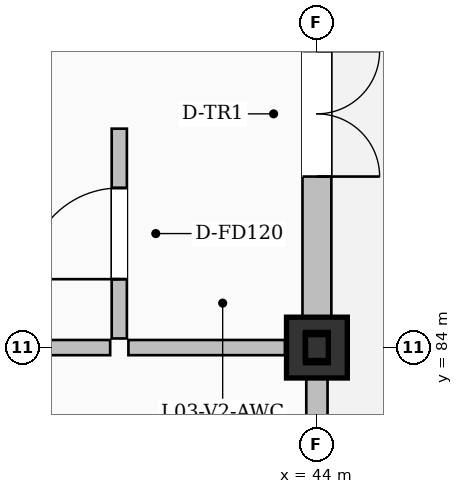
"""IFC4 building model, lengths in metres.
Left out: names, types, materials, properties, quantities, classifications, styles, units other than length and angle.
Written with IfcOpenShell. Run it as: python <this file> out.ifc"""

import sys

from ifc_helpers import new_model, si_unit, direction, frame, frame_2d, origin, origin_2d, place, context, subcontext, project, spatial, rectangle, i_section, extrude, element, fill, save


model = new_model("IFC4")
c1 = context("Model", 3, precision=1e-05, world=origin(), true_north=direction((0.0, 1.0)))
c2 = subcontext(c1, "Body", "Model", "MODEL_VIEW")
j1 = project(units=[si_unit("LENGTHUNIT", "METRE"), si_unit("PLANEANGLEUNIT", "RADIAN")], contexts=[c1])
p1 = place(None, origin())
s1 = spatial("IfcSite", under=j1, at=p1, CompositionType="ELEMENT")
p2 = place(p1, origin())
s2 = spatial("IfcBuilding", under=s1, at=p2, CompositionType="ELEMENT")
p3 = place(p2, frame((0.0, 0.0, 13.8)))
s3 = spatial("IfcBuildingStorey", under=s2, at=p3, CompositionType="ELEMENT", Elevation=13.8)
p4 = place(p3, frame((44.0, 84.0, 0.0), z_axis=(0.0, 0.0, 1.0), x_axis=(1.0, 0.0, 0.0)))
e1 = element("IfcColumn", 1, at=p4, inside=s3, PredefinedType="COLUMN", context=c2, shape_type="SweptSolid", body=[
    extrude(rectangle(XDim=0.8, YDim=0.8, at=origin_2d()), origin(), (0.0, 0.0, 1.0), 4.5),
])
p5 = place(p3, frame((44.0, 84.0, 4.5), z_axis=(0.0, 0.0, 1.0), x_axis=(1.0, 0.0, 0.0)))
e2 = element("IfcColumn", 2, at=p5, inside=s3, PredefinedType="COLUMN", context=c2, shape_type="SweptSolid", body=[
    extrude(i_section(OverallWidth=0.3, OverallDepth=0.4, WebThickness=0.013, FlangeThickness=0.024, FilletRadius=0.027, at=origin_2d()), origin(), (0.0, 0.0, 1.0), 4.1),
])
p6 = place(p3, frame((44.0, 84.0, 8.6), z_axis=(0.0, 0.0, 1.0), x_axis=(1.0, 0.0, 0.0)))
e3 = element("IfcColumn", 3, at=p6, inside=s3, PredefinedType="COLUMN", context=c2, shape_type="SweptSolid", body=[
    extrude(i_section(OverallWidth=0.3, OverallDepth=0.36, WebThickness=0.012, FlangeThickness=0.022, FilletRadius=0.027, at=origin_2d()), origin(), (0.0, 0.0, 1.0), 4.1),
])
p7 = place(p3, frame((44.0, 84.0, 12.7), z_axis=(0.0, 0.0, 1.0), x_axis=(1.0, 0.0, 0.0)))
e4 = element("IfcColumn", 4, at=p7, inside=s3, PredefinedType="COLUMN", context=c2, shape_type="SweptSolid", body=[
    extrude(i_section(OverallWidth=0.3, OverallDepth=0.34, WebThickness=0.012, FlangeThickness=0.021, FilletRadius=0.027, at=origin_2d()), origin(), (0.0, 0.0, 1.0), 4.0),
])
p8 = place(p3, frame((44.0, 84.0, 16.7), z_axis=(0.0, 0.0, 1.0), x_axis=(1.0, 0.0, 0.0)))
e5 = element("IfcColumn", 5, at=p8, inside=s3, PredefinedType="COLUMN", context=c2, shape_type="SweptSolid", body=[
    extrude(i_section(OverallWidth=0.3, OverallDepth=0.34, WebThickness=0.012, FlangeThickness=0.021, FilletRadius=0.027, at=origin_2d()), origin(), (0.0, 0.0, 1.0), 1.117),
])
p9 = place(p3, frame((44.0, 89.75, 0.0), z_axis=(0.0, 0.0, 1.0), x_axis=(0.0, -1.0, 0.0)))
e6 = element("IfcWall", 6, at=p9, inside=s3, PredefinedType="SOLIDWALL", context=c2, shape_type="SweptSolid", body=[
    extrude(rectangle(XDim=5.35, YDim=0.38, at=frame_2d((2.675, 0.0))), origin(), (0.0, 0.0, 1.0), 3.585),
])
p10 = place(p9, frame((1.85, 0.0, 0.0)))
e7 = element("IfcOpeningElement", 7, at=p10, cuts=e6, PredefinedType="OPENING", context=c2, shape_type="SweptSolid", body=[
    extrude(rectangle(XDim=1.65, YDim=2.25, at=frame_2d((0.825, 1.125))), frame((0.0, 0.2, 0.0), z_axis=(0.0, -1.0, 0.0), x_axis=(1.0, 0.0, 0.0)), (0.0, 0.0, 1.0), 0.4),
])
p11 = place(p3, frame((44.0, 83.6, 0.0), z_axis=(0.0, 0.0, 1.0), x_axis=(0.0, -1.0, 0.0)))
e8 = element("IfcWall", 8, at=p11, inside=s3, PredefinedType="SOLIDWALL", context=c2, shape_type="SweptSolid", body=[
    extrude(rectangle(XDim=7.2, YDim=0.28, at=frame_2d((3.6, 0.0))), origin(), (0.0, 0.0, 1.0), 4.066),
])
p12 = place(p11, frame((2.5, 0.0, 0.95)))
e9 = element("IfcOpeningElement", 9, at=p12, cuts=e8, PredefinedType="OPENING", context=c2, shape_type="SweptSolid", body=[
    extrude(rectangle(XDim=2.2, YDim=1.8, at=frame_2d((1.1, 0.9))), frame((0.0, 0.15, 0.0), z_axis=(0.0, -1.0, 0.0), x_axis=(1.0, 0.0, 0.0)), (0.0, 0.0, 1.0), 0.3),
])
p13 = place(p3, frame((41.4, 84.12, 0.0), z_axis=(0.0, 0.0, 1.0), x_axis=(0.0, 1.0, 0.0)))
e10 = element("IfcWall", 10, at=p13, inside=s3, PredefinedType="PARTITIONING", context=c2, shape_type="SweptSolid", body=[
    extrude(rectangle(XDim=2.76, YDim=0.2, at=frame_2d((1.38, 0.0))), origin(), (0.0, 0.0, 1.0), 4.25),
])
p14 = place(p13, frame((0.78, 0.0, 0.0)))
e11 = element("IfcOpeningElement", 11, at=p14, cuts=e10, PredefinedType="OPENING", context=c2, shape_type="SweptSolid", body=[
    extrude(rectangle(XDim=1.2, YDim=2.2, at=frame_2d((0.6, 1.1))), frame((0.0, 0.11, 0.0), z_axis=(0.0, -1.0, 0.0), x_axis=(1.0, 0.0, 0.0)), (0.0, 0.0, 1.0), 0.22),
])
p15 = place(p3, frame((36.42, 84.0, 0.0), z_axis=(0.0, 0.0, 1.0), x_axis=(1.0, 0.0, 0.0)))
e12 = element("IfcWall", 12, at=p15, inside=s3, PredefinedType="PARTITIONING", context=c2, shape_type="SweptSolid", body=[
    extrude(rectangle(XDim=4.86, YDim=0.2, at=frame_2d((2.43, 0.0))), origin(), (0.0, 0.0, 1.0), 4.125),
])
p16 = place(p15, frame((1.53, 0.0, 0.0)))
e13 = element("IfcOpeningElement", 13, at=p16, cuts=e12, PredefinedType="OPENING", context=c2, shape_type="SweptSolid", body=[
    extrude(rectangle(XDim=1.8, YDim=2.35, at=frame_2d((0.9, 1.175))), frame((0.0, 0.11, 0.0), z_axis=(0.0, -1.0, 0.0), x_axis=(1.0, 0.0, 0.0)), (0.0, 0.0, 1.0), 0.22),
])
p17 = place(p3, frame((41.52, 84.0, 0.0), z_axis=(0.0, 0.0, 1.0), x_axis=(1.0, 0.0, 0.0)))
e14 = element("IfcWall", 14, at=p17, inside=s3, PredefinedType="PARTITIONING", context=c2, shape_type="SweptSolid", body=[
    extrude(rectangle(XDim=2.06, YDim=0.2, at=frame_2d((1.03, 0.0))), origin(), (0.0, 0.0, 1.0), 4.125),
])
p18 = place(p10, origin())
e15 = element("IfcDoor", 15, at=p18, inside=s3, OperationType="DOUBLE_DOOR_SINGLE_SWING", PredefinedType="DOOR", context=c2, shape_type="SweptSolid", body=[
    extrude(rectangle(XDim=1.65, YDim=2.25, at=frame_2d((0.825, 1.125))), frame((0.0, 0.025, 0.0), z_axis=(0.0, -1.0, 0.0), x_axis=(1.0, 0.0, 0.0)), (0.0, 0.0, 1.0), 0.05),
])
fill(e7, e15)
p19 = place(p14, origin())
e16 = element("IfcDoor", 16, at=p19, inside=s3, OperationType="SINGLE_SWING_LEFT", PredefinedType="DOOR", context=c2, shape_type="SweptSolid", body=[
    extrude(rectangle(XDim=1.2, YDim=2.2, at=frame_2d((0.6, 1.1))), frame((0.0, 0.025, 0.0), z_axis=(0.0, -1.0, 0.0), x_axis=(1.0, 0.0, 0.0)), (0.0, 0.0, 1.0), 0.05),
])
fill(e11, e16)
save(model, sys.argv[1])
